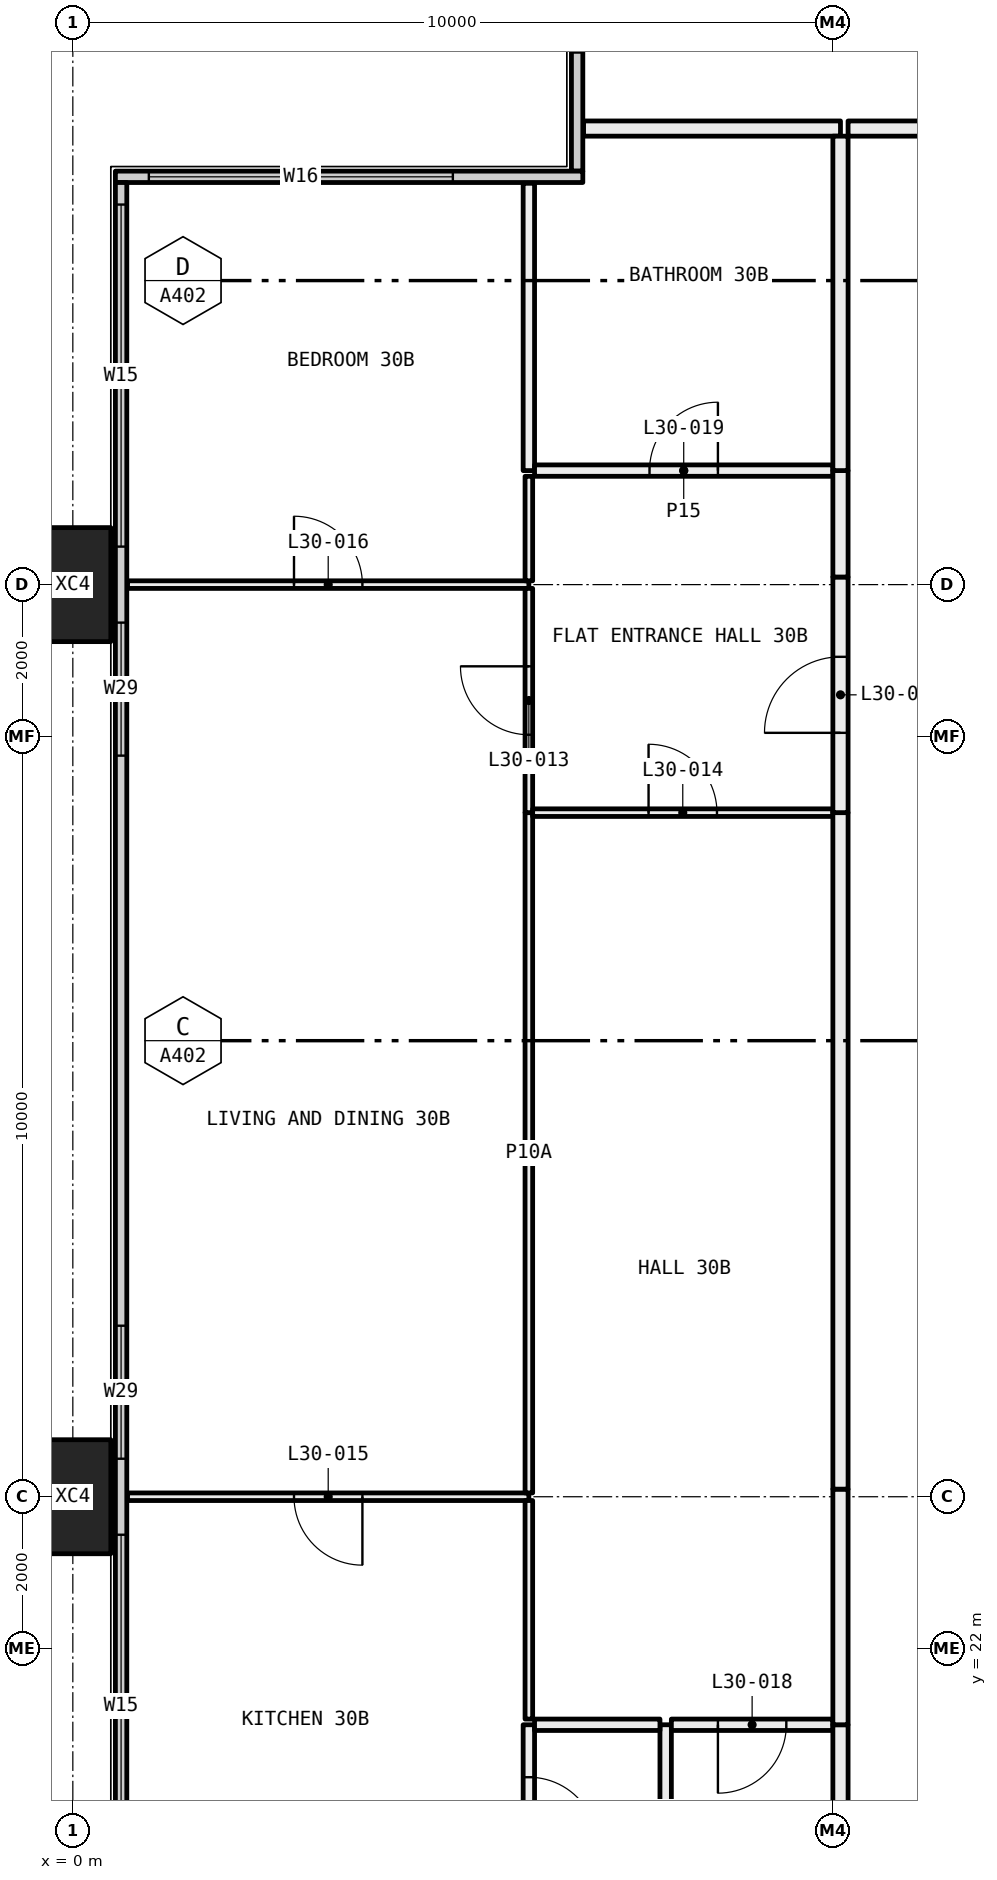
"""IFC4 building model, lengths in metres.
Left out: names, types, materials, properties, quantities, classifications, styles, units other than length and angle.
Written with IfcOpenShell. Run it as: python <this file> out.ifc"""

import sys

from ifc_helpers import new_model, si_unit, direction, frame, frame_2d, origin, origin_2d, place, context, subcontext, project, spatial, rectangle, hollow_rectangle, extrude, element, fill, save


model = new_model("IFC4")
c1 = context("Model", 3, precision=1e-05, world=origin(), true_north=direction((0.0, 1.0)))
c2 = subcontext(c1, "Body", "Model", "MODEL_VIEW")
j1 = project(units=[si_unit("LENGTHUNIT", "METRE"), si_unit("PLANEANGLEUNIT", "RADIAN")], contexts=[c1])
p1 = place(None, origin())
s1 = spatial("IfcSite", under=j1, at=p1, CompositionType="ELEMENT")
p2 = place(p1, origin())
s2 = spatial("IfcBuilding", under=s1, at=p2, CompositionType="ELEMENT")
p3 = place(p2, frame((0.0, 0.0, 117.3)))
s3 = spatial("IfcBuildingStorey", under=s2, at=p3, CompositionType="ELEMENT", Elevation=117.3)
for number, where, z_axis, x_axis in (
    (1, (0.0, 24.0, -0.4), (0.0, 0.0, 1.0), (0.0, 1.0, 0.0)),
    (2, (0.0, 36.0, -0.4), (0.0, 0.0, 1.0), (0.0, 1.0, 0.0)),
):
    element("IfcColumn", number, at=place(p3, frame(where, z_axis=z_axis, x_axis=x_axis)), inside=s3, PredefinedType="COLUMN", context=c2, shape_type="SweptSolid", body=[
        extrude(hollow_rectangle(XDim=1.5, YDim=1.0, WallThickness=0.06, at=origin_2d()), origin(), (0.0, 0.0, 1.0), 3.45),
    ])
p4 = place(p3, frame((6.635, 41.44, 0.0), z_axis=(0.0, 0.0, 1.0), x_axis=(0.0, 1.0, 0.0)))
e3 = element("IfcWall", 3, at=p4, inside=s3, PredefinedType="ELEMENTEDWALL", context=c2, shape_type="SweptSolid", body=[
    extrude(rectangle(XDim=5.85, YDim=0.15, at=frame_2d((2.925, 0.0))), origin(), (0.0, 0.0, 1.0), 3.05),
])
p5 = place(p4, frame((1.56, 0.0, 0.45)))
e4 = element("IfcOpeningElement", 4, at=p5, cuts=e3, PredefinedType="OPENING", context=c2, shape_type="SweptSolid", body=[
    extrude(rectangle(XDim=4.0, YDim=2.55, at=frame_2d((2.0, 1.275))), frame((0.0, 0.085, 0.0), z_axis=(0.0, -1.0, 0.0), x_axis=(1.0, 0.0, 0.0)), (0.0, 0.0, 1.0), 0.17),
])
p6 = place(p3, frame((0.56, 41.365, 0.0), z_axis=(0.0, 0.0, 1.0), x_axis=(1.0, 0.0, 0.0)))
e5 = element("IfcWall", 5, at=p6, inside=s3, PredefinedType="ELEMENTEDWALL", context=c2, shape_type="SweptSolid", body=[
    extrude(rectangle(XDim=6.15, YDim=0.15, at=frame_2d((3.075, 0.0))), origin(), (0.0, 0.0, 1.0), 3.05),
])
p7 = place(p6, frame((0.44, 0.0, 0.45)))
e6 = element("IfcOpeningElement", 6, at=p7, cuts=e5, PredefinedType="OPENING", context=c2, shape_type="SweptSolid", body=[
    extrude(rectangle(XDim=4.0, YDim=2.55, at=frame_2d((2.0, 1.275))), frame((0.0, 0.085, 0.0), z_axis=(0.0, -1.0, 0.0), x_axis=(1.0, 0.0, 0.0)), (0.0, 0.0, 1.0), 0.17),
])
p8 = place(p3, frame((0.635, 18.71, 0.0), z_axis=(0.0, 0.0, 1.0), x_axis=(0.0, 1.0, 0.0)))
e7 = element("IfcWall", 7, at=p8, inside=s3, PredefinedType="ELEMENTEDWALL", context=c2, shape_type="SweptSolid", body=[
    extrude(rectangle(XDim=22.58, YDim=0.15, at=frame_2d((11.29, 0.0))), origin(), (0.0, 0.0, 1.0), 3.05),
])
p9 = place(p8, frame((0.29, 0.0, 0.45)))
e8 = element("IfcOpeningElement", 8, at=p9, cuts=e7, PredefinedType="OPENING", context=c2, shape_type="SweptSolid", body=[
    extrude(rectangle(XDim=4.5, YDim=2.55, at=frame_2d((2.25, 1.275))), frame((0.0, 0.085, 0.0), z_axis=(0.0, -1.0, 0.0), x_axis=(1.0, 0.0, 0.0)), (0.0, 0.0, 1.0), 0.17),
])
p10 = place(p8, frame((5.79, 0.0, 0.45)))
e9 = element("IfcOpeningElement", 9, at=p10, cuts=e7, PredefinedType="OPENING", context=c2, shape_type="SweptSolid", body=[
    extrude(rectangle(XDim=1.75, YDim=2.55, at=frame_2d((0.875, 1.275))), frame((0.0, 0.085, 0.0), z_axis=(0.0, -1.0, 0.0), x_axis=(1.0, 0.0, 0.0)), (0.0, 0.0, 1.0), 0.17),
])
p11 = place(p8, frame((15.04, 0.0, 0.45)))
e10 = element("IfcOpeningElement", 10, at=p11, cuts=e7, PredefinedType="OPENING", context=c2, shape_type="SweptSolid", body=[
    extrude(rectangle(XDim=1.75, YDim=2.55, at=frame_2d((0.875, 1.275))), frame((0.0, 0.085, 0.0), z_axis=(0.0, -1.0, 0.0), x_axis=(1.0, 0.0, 0.0)), (0.0, 0.0, 1.0), 0.17),
])
p12 = place(p8, frame((17.79, 0.0, 0.45)))
e11 = element("IfcOpeningElement", 11, at=p12, cuts=e7, PredefinedType="OPENING", context=c2, shape_type="SweptSolid", body=[
    extrude(rectangle(XDim=4.5, YDim=2.55, at=frame_2d((2.25, 1.275))), frame((0.0, 0.085, 0.0), z_axis=(0.0, -1.0, 0.0), x_axis=(1.0, 0.0, 0.0)), (0.0, 0.0, 1.0), 0.17),
])
p13 = place(p3, frame((6.0, 24.0, 0.0), z_axis=(0.0, 0.0, 1.0), x_axis=(-1.0, 0.0, 0.0)))
e12 = element("IfcWall", 12, at=p13, inside=s3, PredefinedType="PARTITIONING", context=c2, shape_type="SweptSolid", body=[
    extrude(rectangle(XDim=5.28, YDim=0.1, at=frame_2d((2.64, 0.0))), origin(), (0.0, 0.0, 1.0), 2.45),
])
p14 = place(p13, frame((2.19, 0.0, 0.0)))
e13 = element("IfcOpeningElement", 13, at=p14, cuts=e12, PredefinedType="OPENING", context=c2, shape_type="SweptSolid", body=[
    extrude(rectangle(XDim=0.9, YDim=2.1, at=frame_2d((0.45, 1.05))), frame((0.0, 0.06, 0.0), z_axis=(0.0, -1.0, 0.0), x_axis=(1.0, 0.0, 0.0)), (0.0, 0.0, 1.0), 0.12),
])
p15 = place(p3, frame((6.0, 18.72, 0.0), z_axis=(0.0, 0.0, 1.0), x_axis=(0.0, 1.0, 0.0)))
e14 = element("IfcWall", 14, at=p15, inside=s3, PredefinedType="PARTITIONING", context=c2, shape_type="SweptSolid", body=[
    extrude(rectangle(XDim=2.28, YDim=0.15, at=frame_2d((1.14, 0.0))), origin(), (0.0, 0.0, 1.0), 3.05),
])
p16 = place(p15, frame((0.69, 0.0, 0.0)))
e15 = element("IfcOpeningElement", 15, at=p16, cuts=e14, PredefinedType="OPENING", context=c2, shape_type="SweptSolid", body=[
    extrude(rectangle(XDim=0.9, YDim=2.1, at=frame_2d((0.45, 1.05))), frame((0.0, 0.085, 0.0), z_axis=(0.0, -1.0, 0.0), x_axis=(1.0, 0.0, 0.0)), (0.0, 0.0, 1.0), 0.17),
])
p17 = place(p3, frame((6.0, 21.075, 0.0), z_axis=(0.0, 0.0, 1.0), x_axis=(0.0, 1.0, 0.0)))
e16 = element("IfcWall", 16, at=p17, inside=s3, PredefinedType="PARTITIONING", context=c2, shape_type="SweptSolid", body=[
    extrude(rectangle(XDim=2.875, YDim=0.1, at=frame_2d((1.438, 0.0))), origin(), (0.0, 0.0, 1.0), 2.45),
])
p18 = place(p3, frame((6.0, 36.0, 0.0), z_axis=(0.0, 0.0, 1.0), x_axis=(-1.0, 0.0, 0.0)))
e17 = element("IfcWall", 17, at=p18, inside=s3, PredefinedType="PARTITIONING", context=c2, shape_type="SweptSolid", body=[
    extrude(rectangle(XDim=5.28, YDim=0.1, at=frame_2d((2.64, 0.0))), origin(), (0.0, 0.0, 1.0), 2.45),
])
p19 = place(p18, frame((2.19, 0.0, 0.0)))
e18 = element("IfcOpeningElement", 18, at=p19, cuts=e17, PredefinedType="OPENING", context=c2, shape_type="SweptSolid", body=[
    extrude(rectangle(XDim=0.9, YDim=2.1, at=frame_2d((0.45, 1.05))), frame((0.0, 0.06, 0.0), z_axis=(0.0, -1.0, 0.0), x_axis=(1.0, 0.0, 0.0)), (0.0, 0.0, 1.0), 0.12),
])
p20 = place(p3, frame((6.0, 24.05, 0.0), z_axis=(0.0, 0.0, 1.0), x_axis=(0.0, 1.0, 0.0)))
e19 = element("IfcWall", 19, at=p20, inside=s3, PredefinedType="PARTITIONING", context=c2, shape_type="SweptSolid", body=[
    extrude(rectangle(XDim=8.95, YDim=0.1, at=frame_2d((4.475, 0.0))), origin(), (0.0, 0.0, 1.0), 2.45),
])
p21 = place(p3, frame((6.0, 33.0, 0.0), z_axis=(0.0, 0.0, 1.0), x_axis=(0.0, 1.0, 0.0)))
e20 = element("IfcWall", 20, at=p21, inside=s3, PredefinedType="PARTITIONING", context=c2, shape_type="SweptSolid", body=[
    extrude(rectangle(XDim=2.95, YDim=0.1, at=frame_2d((1.475, 0.0))), origin(), (0.0, 0.0, 1.0), 2.45),
])
p22 = place(p21, frame((1.025, 0.0, 0.0)))
e21 = element("IfcOpeningElement", 21, at=p22, cuts=e20, PredefinedType="OPENING", context=c2, shape_type="SweptSolid", body=[
    extrude(rectangle(XDim=0.9, YDim=2.1, at=frame_2d((0.45, 1.05))), frame((0.0, 0.06, 0.0), z_axis=(0.0, -1.0, 0.0), x_axis=(1.0, 0.0, 0.0)), (0.0, 0.0, 1.0), 0.12),
])
p23 = place(p3, frame((6.0, 36.05, 0.0), z_axis=(0.0, 0.0, 1.0), x_axis=(0.0, 1.0, 0.0)))
e22 = element("IfcWall", 22, at=p23, inside=s3, PredefinedType="PARTITIONING", context=c2, shape_type="SweptSolid", body=[
    extrude(rectangle(XDim=1.375, YDim=0.1, at=frame_2d((0.688, 0.0))), origin(), (0.0, 0.0, 1.0), 2.45),
])
p24 = place(p3, frame((6.0, 37.5, 0.0), z_axis=(0.0, 0.0, 1.0), x_axis=(0.0, 1.0, 0.0)))
e23 = element("IfcWall", 23, at=p24, inside=s3, PredefinedType="PARTITIONING", context=c2, shape_type="SweptSolid", body=[
    extrude(rectangle(XDim=3.78, YDim=0.15, at=frame_2d((1.89, 0.0))), origin(), (0.0, 0.0, 1.0), 3.05),
])
p25 = place(p3, frame((7.8, 18.1, 0.0), z_axis=(0.0, 0.0, 1.0), x_axis=(0.0, 1.0, 0.0)))
e24 = element("IfcWall", 24, at=p25, inside=s3, PredefinedType="PARTITIONING", context=c2, shape_type="SweptSolid", body=[
    extrude(rectangle(XDim=2.9, YDim=0.15, at=frame_2d((1.45, 0.0))), origin(), (0.0, 0.0, 1.0), 3.05),
])
p26 = place(p3, frame((7.725, 21.0, 0.0), z_axis=(0.0, 0.0, 1.0), x_axis=(-1.0, 0.0, 0.0)))
e25 = element("IfcWall", 25, at=p26, inside=s3, PredefinedType="PARTITIONING", context=c2, shape_type="SweptSolid", body=[
    extrude(rectangle(XDim=1.65, YDim=0.15, at=frame_2d((0.825, 0.0))), origin(), (0.0, 0.0, 1.0), 3.05),
])
p27 = place(p3, frame((10.0, 21.0, 0.0), z_axis=(0.0, 0.0, 1.0), x_axis=(-1.0, 0.0, 0.0)))
e26 = element("IfcWall", 26, at=p27, inside=s3, PredefinedType="PARTITIONING", context=c2, shape_type="SweptSolid", body=[
    extrude(rectangle(XDim=2.125, YDim=0.15, at=frame_2d((1.062, 0.0))), origin(), (0.0, 0.0, 1.0), 3.05),
])
p28 = place(p27, frame((0.613, 0.0, 0.0)))
e27 = element("IfcOpeningElement", 27, at=p28, cuts=e26, PredefinedType="OPENING", context=c2, shape_type="SweptSolid", body=[
    extrude(rectangle(XDim=0.9, YDim=2.1, at=frame_2d((0.45, 1.05))), frame((0.0, 0.085, 0.0), z_axis=(0.0, -1.0, 0.0), x_axis=(1.0, 0.0, 0.0)), (0.0, 0.0, 1.0), 0.17),
])
p29 = place(p3, frame((10.1, 18.1, 0.0), z_axis=(0.0, 0.0, 1.0), x_axis=(0.0, 1.0, 0.0)))
e28 = element("IfcWall", 28, at=p29, inside=s3, PredefinedType="PARTITIONING", context=c2, shape_type="SweptSolid", body=[
    extrude(rectangle(XDim=2.9, YDim=0.2, at=frame_2d((1.45, 0.0))), origin(), (0.0, 0.0, 1.0), 3.05),
])
p30 = place(p3, frame((10.0, 33.0, 0.0), z_axis=(0.0, 0.0, 1.0), x_axis=(-1.0, 0.0, 0.0)))
e29 = element("IfcWall", 29, at=p30, inside=s3, PredefinedType="PARTITIONING", context=c2, shape_type="SweptSolid", body=[
    extrude(rectangle(XDim=3.95, YDim=0.1, at=frame_2d((1.975, 0.0))), origin(), (0.0, 0.0, 1.0), 3.05),
])
p31 = place(p30, frame((1.525, 0.0, 0.0)))
e30 = element("IfcOpeningElement", 30, at=p31, cuts=e29, PredefinedType="OPENING", context=c2, shape_type="SweptSolid", body=[
    extrude(rectangle(XDim=0.9, YDim=2.1, at=frame_2d((0.45, 1.05))), frame((0.0, 0.06, 0.0), z_axis=(0.0, -1.0, 0.0), x_axis=(1.0, 0.0, 0.0)), (0.0, 0.0, 1.0), 0.12),
])
p32 = place(p3, frame((10.1, 21.0, 0.0), z_axis=(0.0, 0.0, 1.0), x_axis=(0.0, 1.0, 0.0)))
e31 = element("IfcWall", 31, at=p32, inside=s3, PredefinedType="PARTITIONING", context=c2, shape_type="SweptSolid", body=[
    extrude(rectangle(XDim=3.1, YDim=0.2, at=frame_2d((1.55, 0.0))), origin(), (0.0, 0.0, 1.0), 2.45),
])
p33 = place(p3, frame((10.1, 24.1, 0.0), z_axis=(0.0, 0.0, 1.0), x_axis=(0.0, 1.0, 0.0)))
e32 = element("IfcWall", 32, at=p33, inside=s3, PredefinedType="PARTITIONING", context=c2, shape_type="SweptSolid", body=[
    extrude(rectangle(XDim=8.9, YDim=0.2, at=frame_2d((4.45, 0.0))), origin(), (0.0, 0.0, 1.0), 3.05),
])
p34 = place(p3, frame((10.0, 37.5, 0.0), z_axis=(0.0, 0.0, 1.0), x_axis=(-1.0, 0.0, 0.0)))
e33 = element("IfcWall", 33, at=p34, inside=s3, PredefinedType="PARTITIONING", context=c2, shape_type="SweptSolid", body=[
    extrude(rectangle(XDim=3.925, YDim=0.15, at=frame_2d((1.962, 0.0))), origin(), (0.0, 0.0, 1.0), 3.05),
])
p35 = place(p34, frame((1.512, 0.0, 0.0)))
e34 = element("IfcOpeningElement", 34, at=p35, cuts=e33, PredefinedType="OPENING", context=c2, shape_type="SweptSolid", body=[
    extrude(rectangle(XDim=0.9, YDim=2.1, at=frame_2d((0.45, 1.05))), frame((0.0, 0.085, 0.0), z_axis=(0.0, -1.0, 0.0), x_axis=(1.0, 0.0, 0.0)), (0.0, 0.0, 1.0), 0.17),
])
p36 = place(p3, frame((10.1, 33.0, 0.0), z_axis=(0.0, 0.0, 1.0), x_axis=(0.0, 1.0, 0.0)))
e35 = element("IfcWall", 35, at=p36, inside=s3, PredefinedType="PARTITIONING", context=c2, shape_type="SweptSolid", body=[
    extrude(rectangle(XDim=3.1, YDim=0.2, at=frame_2d((1.55, 0.0))), origin(), (0.0, 0.0, 1.0), 2.45),
])
p37 = place(p36, frame((1.05, 0.0, 0.0)))
e36 = element("IfcOpeningElement", 36, at=p37, cuts=e35, PredefinedType="OPENING", context=c2, shape_type="SweptSolid", body=[
    extrude(rectangle(XDim=1.0, YDim=2.1, at=frame_2d((0.5, 1.05))), frame((0.0, 0.11, 0.0), z_axis=(0.0, -1.0, 0.0), x_axis=(1.0, 0.0, 0.0)), (0.0, 0.0, 1.0), 0.22),
])
p38 = place(p3, frame((10.1, 36.1, 0.0), z_axis=(0.0, 0.0, 1.0), x_axis=(0.0, 1.0, 0.0)))
e37 = element("IfcWall", 37, at=p38, inside=s3, PredefinedType="PARTITIONING", context=c2, shape_type="SweptSolid", body=[
    extrude(rectangle(XDim=1.4, YDim=0.2, at=frame_2d((0.7, 0.0))), origin(), (0.0, 0.0, 1.0), 3.05),
])
p39 = place(p3, frame((10.1, 42.0, 0.0), z_axis=(0.0, 0.0, 1.0), x_axis=(-1.0, 0.0, 0.0)))
e38 = element("IfcWall", 38, at=p39, inside=s3, PredefinedType="PARTITIONING", context=c2, shape_type="SweptSolid", body=[
    extrude(rectangle(XDim=3.38, YDim=0.2, at=frame_2d((1.69, 0.0))), origin(), (0.0, 0.0, 1.0), 3.05),
])
p40 = place(p3, frame((10.1, 37.5, 0.0), z_axis=(0.0, 0.0, 1.0), x_axis=(0.0, 1.0, 0.0)))
e39 = element("IfcWall", 39, at=p40, inside=s3, PredefinedType="PARTITIONING", context=c2, shape_type="SweptSolid", body=[
    extrude(rectangle(XDim=4.4, YDim=0.2, at=frame_2d((2.2, 0.0))), origin(), (0.0, 0.0, 1.0), 3.05),
])
p41 = place(p3, frame((10.2, 42.0, 0.0), z_axis=(0.0, 0.0, 1.0), x_axis=(1.0, 0.0, 0.0)))
e40 = element("IfcWall", 40, at=p41, inside=s3, PredefinedType="PARTITIONING", context=c2, shape_type="SweptSolid", body=[
    extrude(rectangle(XDim=1.8, YDim=0.2, at=frame_2d((0.9, 0.0))), origin(), (0.0, 0.0, 1.0), 3.05),
])
p42 = place(p7, origin())
e41 = element("IfcWindow", 41, at=p42, inside=s3, PartitioningType="SINGLE_PANEL", PredefinedType="WINDOW", context=c2, shape_type="SweptSolid", body=[
    extrude(rectangle(XDim=4.0, YDim=2.55, at=frame_2d((2.0, 1.275))), frame((0.0, 0.03, 0.0), z_axis=(0.0, -1.0, 0.0), x_axis=(1.0, 0.0, 0.0)), (0.0, 0.0, 1.0), 0.06),
])
fill(e6, e41)
p43 = place(p9, origin())
e42 = element("IfcWindow", 42, at=p43, inside=s3, PartitioningType="SINGLE_PANEL", PredefinedType="WINDOW", context=c2, shape_type="SweptSolid", body=[
    extrude(rectangle(XDim=4.5, YDim=2.55, at=frame_2d((2.25, 1.275))), frame((0.0, 0.03, 0.0), z_axis=(0.0, -1.0, 0.0), x_axis=(1.0, 0.0, 0.0)), (0.0, 0.0, 1.0), 0.06),
])
fill(e8, e42)
p44 = place(p10, origin())
e43 = element("IfcWindow", 43, at=p44, inside=s3, PartitioningType="SINGLE_PANEL", PredefinedType="WINDOW", context=c2, shape_type="SweptSolid", body=[
    extrude(rectangle(XDim=1.75, YDim=2.55, at=frame_2d((0.875, 1.275))), frame((0.0, 0.03, 0.0), z_axis=(0.0, -1.0, 0.0), x_axis=(1.0, 0.0, 0.0)), (0.0, 0.0, 1.0), 0.06),
])
fill(e9, e43)
p45 = place(p11, origin())
e44 = element("IfcWindow", 44, at=p45, inside=s3, PartitioningType="SINGLE_PANEL", PredefinedType="WINDOW", context=c2, shape_type="SweptSolid", body=[
    extrude(rectangle(XDim=1.75, YDim=2.55, at=frame_2d((0.875, 1.275))), frame((0.0, 0.03, 0.0), z_axis=(0.0, -1.0, 0.0), x_axis=(1.0, 0.0, 0.0)), (0.0, 0.0, 1.0), 0.06),
])
fill(e10, e44)
p46 = place(p12, origin())
e45 = element("IfcWindow", 45, at=p46, inside=s3, PartitioningType="SINGLE_PANEL", PredefinedType="WINDOW", context=c2, shape_type="SweptSolid", body=[
    extrude(rectangle(XDim=4.5, YDim=2.55, at=frame_2d((2.25, 1.275))), frame((0.0, 0.03, 0.0), z_axis=(0.0, -1.0, 0.0), x_axis=(1.0, 0.0, 0.0)), (0.0, 0.0, 1.0), 0.06),
])
fill(e11, e45)
p47 = place(p37, origin())
e46 = element("IfcDoor", 46, at=p47, inside=s3, OperationType="SINGLE_SWING_RIGHT", PredefinedType="DOOR", context=c2, shape_type="SweptSolid", body=[
    extrude(rectangle(XDim=1.0, YDim=2.1, at=frame_2d((0.5, 1.05))), frame((0.0, 0.025, 0.0), z_axis=(0.0, -1.0, 0.0), x_axis=(1.0, 0.0, 0.0)), (0.0, 0.0, 1.0), 0.05),
])
fill(e36, e46)
p48 = place(p22, origin())
e47 = element("IfcDoor", 47, at=p48, inside=s3, OperationType="SINGLE_SWING_LEFT", PredefinedType="DOOR", context=c2, shape_type="SweptSolid", body=[
    extrude(rectangle(XDim=0.9, YDim=2.1, at=frame_2d((0.45, 1.05))), frame((0.0, 0.025, 0.0), z_axis=(0.0, -1.0, 0.0), x_axis=(1.0, 0.0, 0.0)), (0.0, 0.0, 1.0), 0.05),
])
fill(e21, e47)
p49 = place(p31, frame((0.9, 0.0, 0.0), x_axis=(-1.0, 0.0, 0.0)))
e48 = element("IfcDoor", 48, at=p49, inside=s3, OperationType="SINGLE_SWING_RIGHT", PredefinedType="DOOR", context=c2, shape_type="SweptSolid", body=[
    extrude(rectangle(XDim=0.9, YDim=2.1, at=frame_2d((0.45, 1.05))), frame((0.0, 0.025, 0.0), z_axis=(0.0, -1.0, 0.0), x_axis=(1.0, 0.0, 0.0)), (0.0, 0.0, 1.0), 0.05),
])
fill(e30, e48)
p50 = place(p14, origin())
e49 = element("IfcDoor", 49, at=p50, inside=s3, OperationType="SINGLE_SWING_RIGHT", PredefinedType="DOOR", context=c2, shape_type="SweptSolid", body=[
    extrude(rectangle(XDim=0.9, YDim=2.1, at=frame_2d((0.45, 1.05))), frame((0.0, 0.025, 0.0), z_axis=(0.0, -1.0, 0.0), x_axis=(1.0, 0.0, 0.0)), (0.0, 0.0, 1.0), 0.05),
])
fill(e13, e49)
p51 = place(p19, frame((0.9, 0.0, 0.0), x_axis=(-1.0, 0.0, 0.0)))
e50 = element("IfcDoor", 50, at=p51, inside=s3, OperationType="SINGLE_SWING_RIGHT", PredefinedType="DOOR", context=c2, shape_type="SweptSolid", body=[
    extrude(rectangle(XDim=0.9, YDim=2.1, at=frame_2d((0.45, 1.05))), frame((0.0, 0.025, 0.0), z_axis=(0.0, -1.0, 0.0), x_axis=(1.0, 0.0, 0.0)), (0.0, 0.0, 1.0), 0.05),
])
fill(e18, e50)
p52 = place(p16, frame((0.9, 0.0, 0.0), x_axis=(-1.0, 0.0, 0.0)))
e51 = element("IfcDoor", 51, at=p52, inside=s3, OperationType="SINGLE_SWING_LEFT", PredefinedType="DOOR", context=c2, shape_type="SweptSolid", body=[
    extrude(rectangle(XDim=0.9, YDim=2.1, at=frame_2d((0.45, 1.05))), frame((0.0, 0.025, 0.0), z_axis=(0.0, -1.0, 0.0), x_axis=(1.0, 0.0, 0.0)), (0.0, 0.0, 1.0), 0.05),
])
fill(e15, e51)
p53 = place(p28, origin())
e52 = element("IfcDoor", 52, at=p53, inside=s3, OperationType="SINGLE_SWING_LEFT", PredefinedType="DOOR", context=c2, shape_type="SweptSolid", body=[
    extrude(rectangle(XDim=0.9, YDim=2.1, at=frame_2d((0.45, 1.05))), frame((0.0, 0.025, 0.0), z_axis=(0.0, -1.0, 0.0), x_axis=(1.0, 0.0, 0.0)), (0.0, 0.0, 1.0), 0.05),
])
fill(e27, e52)
p54 = place(p35, frame((0.9, 0.0, 0.0), x_axis=(-1.0, 0.0, 0.0)))
e53 = element("IfcDoor", 53, at=p54, inside=s3, OperationType="SINGLE_SWING_LEFT", PredefinedType="DOOR", context=c2, shape_type="SweptSolid", body=[
    extrude(rectangle(XDim=0.9, YDim=2.1, at=frame_2d((0.45, 1.05))), frame((0.0, 0.025, 0.0), z_axis=(0.0, -1.0, 0.0), x_axis=(1.0, 0.0, 0.0)), (0.0, 0.0, 1.0), 0.05),
])
fill(e34, e53)
save(model, sys.argv[1])
